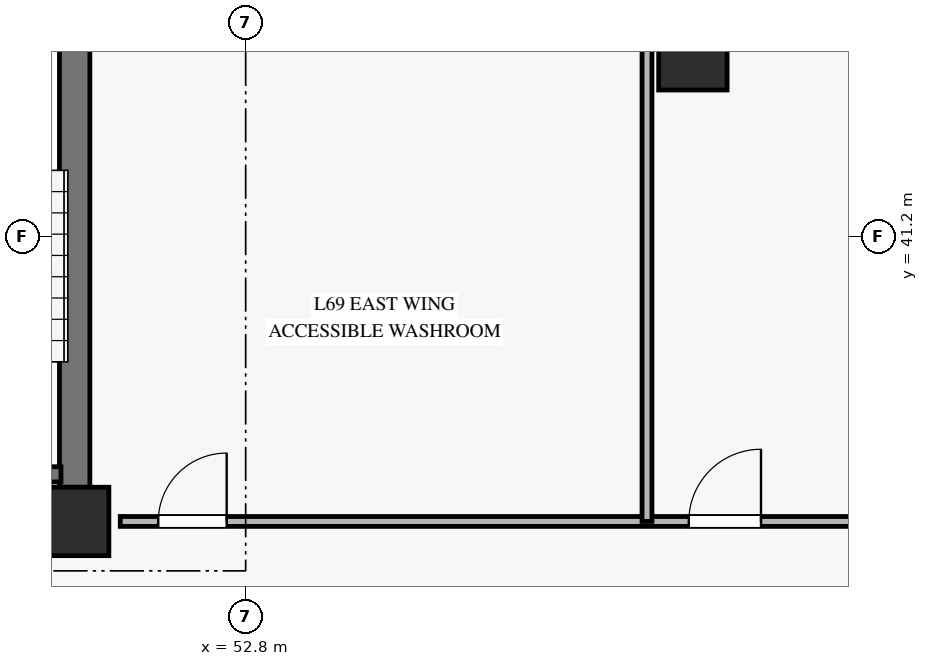
"""IFC4 building model, lengths in metres.
Left out: names, types, materials, properties, quantities, classifications, styles, units other than length and angle.
Written with IfcOpenShell. Run it as: python <this file> out.ifc"""

import sys

from ifc_helpers import new_model, si_unit, direction, frame, frame_2d, origin, origin_2d, place, context, subcontext, project, spatial, rectangle, hollow_rectangle, extrude, source, transform, mapped, element, fill, save


model = new_model("IFC4")
c1 = context("Model", 3, precision=1e-05, world=origin(), true_north=direction((0.0, 1.0)))
c2 = subcontext(c1, "Body", "Model", "MODEL_VIEW")
j1 = project(units=[si_unit("LENGTHUNIT", "METRE"), si_unit("PLANEANGLEUNIT", "RADIAN")], contexts=[c1])
p1 = place(None, origin())
s1 = spatial("IfcSite", under=j1, at=p1, CompositionType="ELEMENT")
p2 = place(p1, origin())
s2 = spatial("IfcBuilding", under=s1, at=p2, CompositionType="ELEMENT")
p3 = place(p2, frame((0.0, 0.0, 268.9)))
s3 = spatial("IfcBuildingStorey", under=s2, at=p3, CompositionType="ELEMENT", Elevation=268.9)
m1 = source(origin(), c2, "Body", "SweptSolid", [
    extrude(rectangle(XDim=0.9, YDim=0.9, at=origin_2d()), origin(), (0.0, 0.0, 1.0), 3.185),
])
p4 = place(p3, frame((50.55, 37.45, 0.0), z_axis=(0.0, 0.0, 1.0), x_axis=(1.0, 0.0, 0.0)))
e1 = element("IfcColumn", 1, at=p4, inside=s3, PredefinedType="PILASTER", context=c2, shape_type="MappedRepresentation", body=[
    mapped(m1, transform((0.0, 0.0, 0.0), x_axis=(1.0, 0.0, 0.0), y_axis=(0.0, 1.0, 0.0), z_axis=(0.0, 0.0, 1.0), scale=1.0)),
])
p5 = place(p3, frame((50.55, 37.9, 0.0), z_axis=(0.0, 0.0, 1.0), x_axis=(0.0, 1.0, 0.0)))
e2 = element("IfcWall", 2, at=p5, inside=s3, PredefinedType="SHEAR", context=c2, shape_type="SweptSolid", body=[
    extrude(rectangle(XDim=8.2, YDim=0.4, at=frame_2d((4.1, 0.0))), origin(), (0.0, 0.0, 1.0), 3.185),
])
m2 = source(origin(), c2, "Body", "SweptSolid", [
    extrude(hollow_rectangle(XDim=0.9, YDim=0.9, WallThickness=0.04, at=origin_2d()), origin(), (0.0, 0.0, 1.0), 3.185),
])
p6 = place(p3, frame((58.684, 43.577, 0.0), z_axis=(0.0, 0.0, 1.0), x_axis=(1.0, 0.0, 0.0)))
e3 = element("IfcColumn", 3, at=p6, inside=s3, PredefinedType="COLUMN", context=c2, shape_type="MappedRepresentation", body=[
    mapped(m2, transform((0.0, 0.0, 0.0), x_axis=(1.0, 0.0, 0.0), y_axis=(0.0, 1.0, 0.0), z_axis=(0.0, 0.0, 1.0), scale=1.0)),
])
p7 = place(p3, frame((61.207, 43.577, 0.0), z_axis=(0.0, 0.0, 1.0), x_axis=(-0.651914250567, 0.758292694089, 0.0)))
e4 = element("IfcWall", 4, at=p7, inside=s3, PredefinedType="SOLIDWALL", context=c2, shape_type="SweptSolid", body=[
    extrude(rectangle(XDim=3.525, YDim=0.3, at=frame_2d((1.763, 0.0))), origin(), (0.0, 0.0, 1.0), 2.815),
])
p8 = place(p7, frame((0.963, 0.0, 0.45)))
e5 = element("IfcOpeningElement", 5, at=p8, cuts=e4, PredefinedType="OPENING", context=c2, shape_type="SweptSolid", body=[
    extrude(rectangle(XDim=1.6, YDim=2.0, at=frame_2d((0.8, 1.0))), frame((0.0, 0.16, 0.0), z_axis=(0.0, -1.0, 0.0), x_axis=(1.0, 0.0, 0.0)), (0.0, 0.0, 1.0), 0.32),
])
p9 = place(p3, frame((47.44, 38.07, 0.0), z_axis=(0.0, 0.0, 1.0), x_axis=(1.0, 0.0, 0.0)))
e6 = element("IfcWall", 6, at=p9, inside=s3, PredefinedType="SOLIDWALL", context=c2, shape_type="SweptSolid", body=[
    extrude(rectangle(XDim=2.93, YDim=0.2, at=frame_2d((1.465, 0.0))), origin(), (0.0, 0.0, 1.0), 3.4),
])
p10 = place(p3, frame((51.15, 37.45, 0.0), z_axis=(0.0, 0.0, 1.0), x_axis=(1.0, 0.0, 0.0)))
e7 = element("IfcWall", 7, at=p10, inside=s3, PredefinedType="PARTITIONING", context=c2, shape_type="SweptSolid", body=[
    extrude(rectangle(XDim=10.057, YDim=0.13, at=frame_2d((5.029, 0.0))), origin(), (0.0, 0.0, 1.0), 2.82),
])
p11 = place(p10, frame((0.5, 0.0, 0.0)))
e8 = element("IfcOpeningElement", 8, at=p11, cuts=e7, PredefinedType="OPENING", context=c2, shape_type="SweptSolid", body=[
    extrude(rectangle(XDim=0.9, YDim=2.1, at=frame_2d((0.45, 1.05))), frame((0.0, 0.075, 0.0), z_axis=(0.0, -1.0, 0.0), x_axis=(1.0, 0.0, 0.0)), (0.0, 0.0, 1.0), 0.15),
])
p12 = place(p10, frame((7.48, 0.0, 0.0)))
e9 = element("IfcOpeningElement", 9, at=p12, cuts=e7, PredefinedType="OPENING", context=c2, shape_type="SweptSolid", body=[
    extrude(rectangle(XDim=0.95, YDim=2.1, at=frame_2d((0.475, 1.05))), frame((0.0, 0.075, 0.0), z_axis=(0.0, -1.0, 0.0), x_axis=(1.0, 0.0, 0.0)), (0.0, 0.0, 1.0), 0.15),
])
p13 = place(p3, frame((58.08, 37.45, 0.0), z_axis=(0.0, 0.0, 1.0), x_axis=(0.0, 1.0, 0.0)))
e10 = element("IfcWall", 10, at=p13, inside=s3, PredefinedType="PARTITIONING", context=c2, shape_type="SweptSolid", body=[
    extrude(rectangle(XDim=8.8, YDim=0.13, at=frame_2d((4.4, 0.0))), origin(), (0.0, 0.0, 1.0), 3.185),
])
m3 = source(origin(), c2, "Body", "SweptSolid", [
    extrude(rectangle(XDim=0.9, YDim=2.1, at=frame_2d((0.45, 1.05))), frame((0.0, 0.025, 0.0), z_axis=(0.0, -1.0, 0.0), x_axis=(1.0, 0.0, 0.0)), (0.0, 0.0, 1.0), 0.05),
])
p14 = place(p11, origin())
e11 = element("IfcDoor", 11, at=p14, inside=s3, OperationType="SINGLE_SWING_RIGHT", PredefinedType="DOOR", context=c2, shape_type="MappedRepresentation", body=[
    mapped(m3, transform((0.0, 0.0, 0.0), x_axis=(1.0, 0.0, 0.0), y_axis=(0.0, 1.0, 0.0), z_axis=(0.0, 0.0, 1.0), scale=1.0)),
])
fill(e8, e11)
m4 = source(origin(), c2, "Body", "SweptSolid", [
    extrude(rectangle(XDim=0.95, YDim=2.1, at=frame_2d((0.475, 1.05))), frame((0.0, 0.025, 0.0), z_axis=(0.0, -1.0, 0.0), x_axis=(1.0, 0.0, 0.0)), (0.0, 0.0, 1.0), 0.05),
])
p15 = place(p12, origin())
e12 = element("IfcDoor", 12, at=p15, inside=s3, OperationType="SINGLE_SWING_RIGHT", PredefinedType="DOOR", context=c2, shape_type="MappedRepresentation", body=[
    mapped(m4, transform((0.0, 0.0, 0.0), x_axis=(1.0, 0.0, 0.0), y_axis=(0.0, 1.0, 0.0), z_axis=(0.0, 0.0, 1.0), scale=1.0)),
])
fill(e9, e12)
save(model, sys.argv[1])
